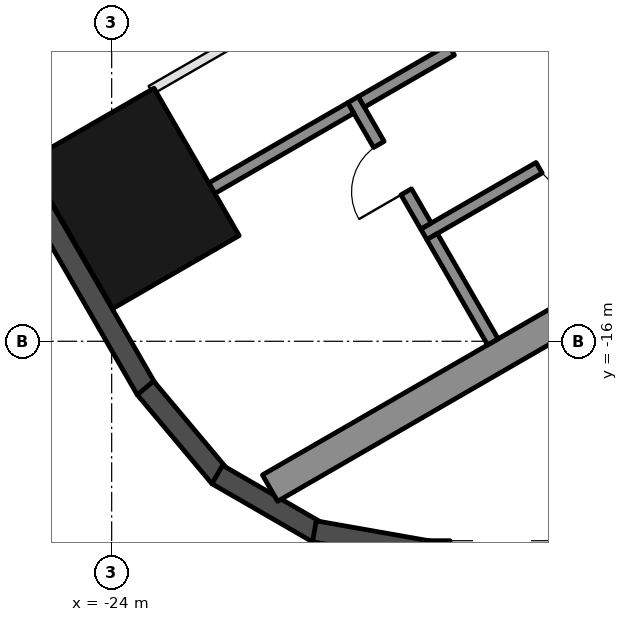
"""IFC4 building model, lengths in metres.
Left out: names, types, materials, properties, quantities, classifications, styles, units other than length and angle.
Written with IfcOpenShell. Run it as: python <this file> out.ifc"""

import sys

from ifc_helpers import new_model, si_unit, direction, frame, frame_2d, origin, origin_2d, place, context, subcontext, project, spatial, rectangle, hollow_rectangle, extrude, element, fill, save


model = new_model("IFC4")
c1 = context("Model", 3, precision=1e-05, world=origin(), true_north=direction((0.0, 1.0)))
c2 = subcontext(c1, "Body", "Model", "MODEL_VIEW")
j1 = project(units=[si_unit("LENGTHUNIT", "METRE"), si_unit("PLANEANGLEUNIT", "RADIAN")], contexts=[c1])
p1 = place(None, origin())
s1 = spatial("IfcSite", under=j1, at=p1, CompositionType="ELEMENT")
p2 = place(p1, origin())
s2 = spatial("IfcBuilding", under=s1, at=p2, CompositionType="ELEMENT")
p3 = place(p2, frame((0.0, 0.0, 79.8)))
s3 = spatial("IfcBuildingStorey", under=s2, at=p3, CompositionType="ELEMENT", Elevation=79.8)
p4 = place(p3, frame((-23.643, -13.65, 0.0), z_axis=(0.0, 0.0, 1.0), x_axis=(-0.5, 0.866025403784, 0.0)))
e1 = element("IfcColumn", 1, at=p4, inside=s3, PredefinedType="COLUMN", context=c2, shape_type="SweptSolid", body=[
    extrude(hollow_rectangle(XDim=2.8, YDim=2.4, WallThickness=0.07, at=origin_2d()), origin(), (0.0, 0.0, 1.0), 3.7),
])
p5 = place(p3, frame((-26.257, -11.893, 0.0), z_axis=(0.0, 0.0, 1.0), x_axis=(0.500018773155, -0.866014564827, 0.0)))
e2 = element("IfcWall", 2, at=p5, inside=s3, PredefinedType="SOLIDWALL", context=c2, shape_type="SweptSolid", body=[
    extrude(rectangle(XDim=5.658, YDim=0.35, at=frame_2d((2.829, 0.0))), origin(), (0.0, 0.0, 1.0), 3.55),
])
for number, where, z_axis, x_axis in (
    (3, (-23.445, -16.768, 0.0), (0.0, 0.0, 1.0), (0.643, -0.766, 0.0)),
    (4, (-22.264, -18.192, 0.0), (0.0, 0.0, 1.0), (0.866, -0.5, 0.0)),
):
    element("IfcWall", number, at=place(p3, frame(where, z_axis=z_axis, x_axis=x_axis)), inside=s3, PredefinedType="SOLIDWALL", context=c2, shape_type="SweptSolid", body=[
        extrude(rectangle(XDim=1.91, YDim=0.35, at=frame_2d((0.955, 0.0))), origin(), (0.0, 0.0, 1.0), 3.55),
    ])
p6 = place(p3, frame((-20.667, -19.126, 0.0), z_axis=(0.0, 0.0, 1.0), x_axis=(0.984798995425, -0.173697837091, 0.0)))
e5 = element("IfcWall", 5, at=p6, inside=s3, PredefinedType="SOLIDWALL", context=c2, shape_type="SweptSolid", body=[
    extrude(rectangle(XDim=1.91, YDim=0.35, at=frame_2d((0.955, 0.0))), origin(), (0.0, 0.0, 1.0), 3.55),
])
p7 = place(p3, frame((-18.816, -19.455, 0.0), z_axis=(0.0, 0.0, 1.0), x_axis=(1.0, 0.0, 0.0)))
e6 = element("IfcWall", 6, at=p7, inside=s3, PredefinedType="SOLIDWALL", context=c2, shape_type="SweptSolid", body=[
    extrude(rectangle(XDim=11.816, YDim=0.35, at=frame_2d((5.908, 0.0))), origin(), (0.0, 0.0, 1.0), 3.55),
])
p8 = place(p7, frame((0.381, 0.0, 0.3)))
e7 = element("IfcOpeningElement", 7, at=p8, cuts=e6, PredefinedType="OPENING", context=c2, shape_type="SweptSolid", body=[
    extrude(rectangle(XDim=1.7, YDim=2.65, at=frame_2d((0.85, 1.325))), frame((0.0, 0.185, 0.0), z_axis=(0.0, -1.0, 0.0), x_axis=(1.0, 0.0, 0.0)), (0.0, 0.0, 1.0), 0.37),
])
p9 = place(p7, frame((7.665, 0.0, 0.0)))
e8 = element("IfcOpeningElement", 8, at=p9, cuts=e6, PredefinedType="OPENING", context=c2, shape_type="SweptSolid", body=[
    extrude(rectangle(XDim=2.4, YDim=2.4, at=frame_2d((1.2, 1.2))), frame((0.0, 0.185, 0.0), z_axis=(0.0, -1.0, 0.0), x_axis=(1.0, 0.0, 0.0)), (0.0, 0.0, 1.0), 0.37),
])
p10 = place(p7, frame((3.866, 0.0, 0.3)))
e9 = element("IfcOpeningElement", 9, at=p10, cuts=e6, PredefinedType="OPENING", context=c2, shape_type="SweptSolid", body=[
    extrude(rectangle(XDim=1.5, YDim=2.65, at=frame_2d((0.75, 1.325))), frame((0.0, 0.185, 0.0), z_axis=(0.0, -1.0, 0.0), x_axis=(1.0, 0.0, 0.0)), (0.0, 0.0, 1.0), 0.37),
])
p11 = place(p7, frame((5.666, 0.0, 0.3)))
e10 = element("IfcOpeningElement", 10, at=p11, cuts=e6, PredefinedType="OPENING", context=c2, shape_type="SweptSolid", body=[
    extrude(rectangle(XDim=1.5, YDim=2.65, at=frame_2d((0.75, 1.325))), frame((0.0, 0.185, 0.0), z_axis=(0.0, -1.0, 0.0), x_axis=(1.0, 0.0, 0.0)), (0.0, 0.0, 1.0), 0.37),
])
p12 = place(p3, frame((-8.547, -10.997, 0.0), z_axis=(0.0, 0.0, 1.0), x_axis=(-0.866025009528, -0.500000682871, 0.0)))
e11 = element("IfcWall", 11, at=p12, inside=s3, PredefinedType="SHEAR", context=c2, shape_type="SweptSolid", body=[
    extrude(rectangle(XDim=14.837, YDim=0.5, at=frame_2d((7.418, 0.0))), origin(), (0.0, 0.0, 1.0), 3.5),
])
p13 = place(p3, frame((-10.068, -9.162, 0.0), z_axis=(0.0, 0.0, 1.0), x_axis=(-0.866032725843, -0.499987317609, 0.0)))
e12 = element("IfcWall", 12, at=p13, inside=s3, PredefinedType="SHEAR", context=c2, shape_type="SweptSolid", body=[
    extrude(rectangle(XDim=10.16, YDim=0.2, at=frame_2d((5.08, 0.0))), origin(), (0.0, 0.0, 1.0), 3.5),
])
p14 = place(p13, frame((1.99, 0.0, 0.0)))
e13 = element("IfcOpeningElement", 13, at=p14, cuts=e12, PredefinedType="OPENING", context=c2, shape_type="SweptSolid", body=[
    extrude(rectangle(XDim=0.9, YDim=2.1, at=frame_2d((0.45, 1.05))), frame((0.0, 0.11, 0.0), z_axis=(0.0, -1.0, 0.0), x_axis=(1.0, 0.0, 0.0)), (0.0, 0.0, 1.0), 0.22),
])
p15 = place(p13, frame((7.07, 0.0, 0.0)))
e14 = element("IfcOpeningElement", 14, at=p15, cuts=e12, PredefinedType="OPENING", context=c2, shape_type="SweptSolid", body=[
    extrude(rectangle(XDim=0.9, YDim=2.1, at=frame_2d((0.45, 1.05))), frame((0.0, 0.11, 0.0), z_axis=(0.0, -1.0, 0.0), x_axis=(1.0, 0.0, 0.0)), (0.0, 0.0, 1.0), 0.22),
])
p16 = place(p3, frame((-20.031, -12.026, 0.0), z_axis=(0.0, 0.0, 1.0), x_axis=(0.500033551112, -0.866006032174, 0.0)))
e15 = element("IfcWall", 15, at=p16, inside=s3, PredefinedType="SHEAR", context=c2, shape_type="SweptSolid", body=[
    extrude(rectangle(XDim=2.4, YDim=0.2, at=frame_2d((1.2, 0.0))), origin(), (0.0, 0.0, 1.0), 3.5),
])
p17 = place(p16, frame((0.85, 0.0, 0.0)))
e16 = element("IfcOpeningElement", 16, at=p17, cuts=e15, PredefinedType="OPENING", context=c2, shape_type="SweptSolid", body=[
    extrude(rectangle(XDim=0.9, YDim=2.1, at=frame_2d((0.45, 1.05))), frame((0.0, 0.11, 0.0), z_axis=(0.0, -1.0, 0.0), x_axis=(1.0, 0.0, 0.0)), (0.0, 0.0, 1.0), 0.22),
])
p18 = place(p3, frame((-18.413, -11.208, 0.0), z_axis=(0.0, 0.0, 1.0), x_axis=(-0.866038183914, -0.499977863513, 0.0)))
e17 = element("IfcWall", 17, at=p18, inside=s3, PredefinedType="SHEAR", context=c2, shape_type="SweptSolid", body=[
    extrude(rectangle(XDim=1.71, YDim=0.2, at=frame_2d((0.855, 0.0))), origin(), (0.0, 0.0, 1.0), 3.5),
])
p19 = place(p3, frame((-18.73, -14.278, 0.0), z_axis=(0.0, 0.0, 1.0), x_axis=(0.50002537861, -0.866010750942, 0.0)))
e18 = element("IfcWall", 18, at=p19, inside=s3, PredefinedType="SHEAR", context=c2, shape_type="SweptSolid", body=[
    extrude(rectangle(XDim=2.0, YDim=0.2, at=frame_2d((1.0, 0.0))), origin(), (0.0, 0.0, 1.0), 3.5),
])
p20 = place(p3, frame((-20.067, -12.163, 0.0), z_axis=(0.0, 0.0, 1.0), x_axis=(-0.866060851709, -0.499938597367, 0.0)))
e19 = element("IfcWall", 19, at=p20, inside=s3, PredefinedType="SHEAR", context=c2, shape_type="SweptSolid", body=[
    extrude(rectangle(XDim=2.64, YDim=0.2, at=frame_2d((1.32, 0.0))), origin(), (0.0, 0.0, 1.0), 3.5),
])
p21 = place(p3, frame((-19.363, -9.562, 0.0), z_axis=(0.0, 0.0, 1.0), x_axis=(-0.86601185002, -0.500023475074, 0.0)))
e20 = element("IfcWall", 20, at=p21, inside=s3, PredefinedType="PARTITIONING", context=c2, shape_type="SweptSolid", body=[
    extrude(rectangle(XDim=4.61, YDim=0.15, at=frame_2d((2.305, 0.0))), origin(), (0.0, 0.0, 1.0), 3.5),
])
p22 = place(p15, origin())
e21 = element("IfcDoor", 21, at=p22, inside=s3, OperationType="SINGLE_SWING_LEFT", PredefinedType="DOOR", context=c2, shape_type="SweptSolid", body=[
    extrude(rectangle(XDim=0.9, YDim=2.1, at=frame_2d((0.45, 1.05))), frame((0.0, 0.025, 0.0), z_axis=(0.0, -1.0, 0.0), x_axis=(1.0, 0.0, 0.0)), (0.0, 0.0, 1.0), 0.05),
])
fill(e14, e21)
p23 = place(p17, frame((0.9, 0.0, 0.0), z_axis=(0.0, 0.0, 1.0), x_axis=(-1.0, 0.0, 0.0)))
e22 = element("IfcDoor", 22, at=p23, inside=s3, OperationType="SINGLE_SWING_LEFT", PredefinedType="DOOR", context=c2, shape_type="SweptSolid", body=[
    extrude(rectangle(XDim=0.9, YDim=2.1, at=frame_2d((0.45, 1.05))), frame((0.0, 0.025, 0.0), z_axis=(0.0, -1.0, 0.0), x_axis=(1.0, 0.0, 0.0)), (0.0, 0.0, 1.0), 0.05),
])
fill(e16, e22)
save(model, sys.argv[1])
